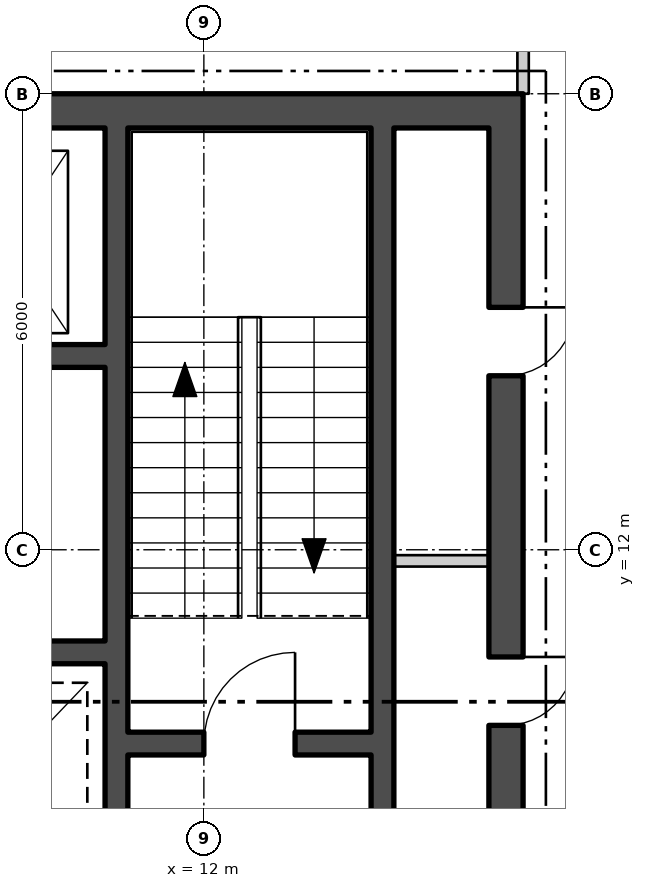
"""IFC4 building model, lengths in metres.
Left out: names, types, materials, properties, quantities, classifications, styles, units other than length and angle.
Written with IfcOpenShell. Run it as: python <this file> out.ifc"""

import sys

from ifc_helpers import new_model, si_unit, direction, frame, frame_2d, origin, place, context, subcontext, project, spatial, polyline, rectangle, outline, extrude, element, fill, save


model = new_model("IFC4")
c1 = context("Model", 3, precision=1e-05, world=origin(), true_north=direction((0.0, 1.0)))
c2 = subcontext(c1, "Body", "Model", "MODEL_VIEW")
j1 = project(units=[si_unit("LENGTHUNIT", "METRE"), si_unit("PLANEANGLEUNIT", "RADIAN")], contexts=[c1])
p1 = place(None, origin())
s1 = spatial("IfcSite", under=j1, at=p1, CompositionType="ELEMENT")
p2 = place(p1, origin())
s2 = spatial("IfcBuilding", under=s1, at=p2, CompositionType="ELEMENT")
p3 = place(p2, frame((0.0, 0.0, 192.6)))
s3 = spatial("IfcBuildingStorey", under=s2, at=p3, CompositionType="ELEMENT", Elevation=192.6)
p4 = place(p3, frame((3.67, -25.994, -0.18), z_axis=(0.0, 0.0, 1.0), x_axis=(0.499999764979, 0.866025539474, 0.0)))
e1 = element("IfcWall", 1, at=p4, inside=s3, PredefinedType="SOLIDWALL", context=c2, shape_type="SweptSolid", body=[
    extrude(outline(polyline([(-0.13, -0.225), (45.87, -0.225), (45.61, 0.225), (0.13, 0.225), (-0.13, -0.225)])), origin(), (0.0, 0.0, 1.0), 3.68),
])
p5 = place(p4, frame((1.424, 0.0, 1.08)))
e2 = element("IfcOpeningElement", 2, at=p5, cuts=e1, PredefinedType="OPENING", context=c2, shape_type="SweptSolid", body=[
    extrude(rectangle(XDim=2.4, YDim=2.0, at=frame_2d((1.2, 1.0))), frame((0.0, 0.235, 0.0), z_axis=(0.0, -1.0, 0.0), x_axis=(1.0, 0.0, 0.0)), (0.0, 0.0, 1.0), 0.47),
])
p6 = place(p4, frame((5.893, 0.0, 1.08)))
e3 = element("IfcOpeningElement", 3, at=p6, cuts=e1, PredefinedType="OPENING", context=c2, shape_type="SweptSolid", body=[
    extrude(rectangle(XDim=2.4, YDim=2.0, at=frame_2d((1.2, 1.0))), frame((0.0, 0.235, 0.0), z_axis=(0.0, -1.0, 0.0), x_axis=(1.0, 0.0, 0.0)), (0.0, 0.0, 1.0), 0.47),
])
p7 = place(p4, frame((10.401, 0.0, 1.08)))
e4 = element("IfcOpeningElement", 4, at=p7, cuts=e1, PredefinedType="OPENING", context=c2, shape_type="SweptSolid", body=[
    extrude(rectangle(XDim=2.4, YDim=2.0, at=frame_2d((1.2, 1.0))), frame((0.0, 0.235, 0.0), z_axis=(0.0, -1.0, 0.0), x_axis=(1.0, 0.0, 0.0)), (0.0, 0.0, 1.0), 0.47),
])
p8 = place(p4, frame((14.909, 0.0, 1.08)))
e5 = element("IfcOpeningElement", 5, at=p8, cuts=e1, PredefinedType="OPENING", context=c2, shape_type="SweptSolid", body=[
    extrude(rectangle(XDim=2.4, YDim=2.0, at=frame_2d((1.2, 1.0))), frame((0.0, 0.235, 0.0), z_axis=(0.0, -1.0, 0.0), x_axis=(1.0, 0.0, 0.0)), (0.0, 0.0, 1.0), 0.47),
])
p9 = place(p4, frame((19.416, 0.0, 1.08)))
e6 = element("IfcOpeningElement", 6, at=p9, cuts=e1, PredefinedType="OPENING", context=c2, shape_type="SweptSolid", body=[
    extrude(rectangle(XDim=2.4, YDim=2.0, at=frame_2d((1.2, 1.0))), frame((0.0, 0.235, 0.0), z_axis=(0.0, -1.0, 0.0), x_axis=(1.0, 0.0, 0.0)), (0.0, 0.0, 1.0), 0.47),
])
p10 = place(p4, frame((23.924, 0.0, 1.08)))
e7 = element("IfcOpeningElement", 7, at=p10, cuts=e1, PredefinedType="OPENING", context=c2, shape_type="SweptSolid", body=[
    extrude(rectangle(XDim=2.4, YDim=2.0, at=frame_2d((1.2, 1.0))), frame((0.0, 0.235, 0.0), z_axis=(0.0, -1.0, 0.0), x_axis=(1.0, 0.0, 0.0)), (0.0, 0.0, 1.0), 0.47),
])
p11 = place(p4, frame((28.431, 0.0, 1.08)))
e8 = element("IfcOpeningElement", 8, at=p11, cuts=e1, PredefinedType="OPENING", context=c2, shape_type="SweptSolid", body=[
    extrude(rectangle(XDim=2.4, YDim=2.0, at=frame_2d((1.2, 1.0))), frame((0.0, 0.235, 0.0), z_axis=(0.0, -1.0, 0.0), x_axis=(1.0, 0.0, 0.0)), (0.0, 0.0, 1.0), 0.47),
])
p12 = place(p4, frame((32.939, 0.0, 1.08)))
e9 = element("IfcOpeningElement", 9, at=p12, cuts=e1, PredefinedType="OPENING", context=c2, shape_type="SweptSolid", body=[
    extrude(rectangle(XDim=2.4, YDim=2.0, at=frame_2d((1.2, 1.0))), frame((0.0, 0.235, 0.0), z_axis=(0.0, -1.0, 0.0), x_axis=(1.0, 0.0, 0.0)), (0.0, 0.0, 1.0), 0.47),
])
p13 = place(p4, frame((37.447, 0.0, 1.08)))
e10 = element("IfcOpeningElement", 10, at=p13, cuts=e1, PredefinedType="OPENING", context=c2, shape_type="SweptSolid", body=[
    extrude(rectangle(XDim=2.4, YDim=2.0, at=frame_2d((1.2, 1.0))), frame((0.0, 0.235, 0.0), z_axis=(0.0, -1.0, 0.0), x_axis=(1.0, 0.0, 0.0)), (0.0, 0.0, 1.0), 0.47),
])
p14 = place(p4, frame((41.916, 0.0, 1.08)))
e11 = element("IfcOpeningElement", 11, at=p14, cuts=e1, PredefinedType="OPENING", context=c2, shape_type="SweptSolid", body=[
    extrude(rectangle(XDim=2.4, YDim=2.0, at=frame_2d((1.2, 1.0))), frame((0.0, 0.235, 0.0), z_axis=(0.0, -1.0, 0.0), x_axis=(1.0, 0.0, 0.0)), (0.0, 0.0, 1.0), 0.47),
])
p15 = place(p3, frame((-16.2, 17.775, 0.0), z_axis=(0.0, 0.0, 1.0), x_axis=(1.0, 0.0, 0.0)))
e12 = element("IfcWall", 12, at=p15, inside=s3, PredefinedType="SHEAR", context=c2, shape_type="SweptSolid", body=[
    extrude(rectangle(XDim=32.4, YDim=0.45, at=frame_2d((16.2, 0.0))), origin(), (0.0, 0.0, 1.0), 3.7),
])
p16 = place(p3, frame((15.975, 2.45, 0.0), z_axis=(0.0, 0.0, 1.0), x_axis=(0.0, 1.0, 0.0)))
e13 = element("IfcWall", 13, at=p16, inside=s3, PredefinedType="SHEAR", context=c2, shape_type="SweptSolid", body=[
    extrude(rectangle(XDim=15.1, YDim=0.45, at=frame_2d((7.55, 0.0))), origin(), (0.0, 0.0, 1.0), 3.7),
])
p17 = place(p16, frame((4.4, 0.0, 0.0)))
e14 = element("IfcOpeningElement", 14, at=p17, cuts=e13, PredefinedType="OPENING", context=c2, shape_type="SweptSolid", body=[
    extrude(rectangle(XDim=1.5, YDim=2.1, at=frame_2d((0.75, 1.05))), frame((0.0, 0.235, 0.0), z_axis=(0.0, -1.0, 0.0), x_axis=(1.0, 0.0, 0.0)), (0.0, 0.0, 1.0), 0.47),
])
p18 = place(p16, frame((0.85, 0.0, 0.0)))
e15 = element("IfcOpeningElement", 15, at=p18, cuts=e13, PredefinedType="OPENING", context=c2, shape_type="SweptSolid", body=[
    extrude(rectangle(XDim=0.9, YDim=2.1, at=frame_2d((0.45, 1.05))), frame((0.0, 0.235, 0.0), z_axis=(0.0, -1.0, 0.0), x_axis=(1.0, 0.0, 0.0)), (0.0, 0.0, 1.0), 0.47),
])
p19 = place(p16, frame((3.0, 0.0, 0.0)))
e16 = element("IfcOpeningElement", 16, at=p19, cuts=e13, PredefinedType="OPENING", context=c2, shape_type="SweptSolid", body=[
    extrude(rectangle(XDim=1.0, YDim=2.1, at=frame_2d((0.5, 1.05))), frame((0.0, 0.235, 0.0), z_axis=(0.0, -1.0, 0.0), x_axis=(1.0, 0.0, 0.0)), (0.0, 0.0, 1.0), 0.47),
])
p20 = place(p16, frame((7.239, 0.0, 0.0)))
e17 = element("IfcOpeningElement", 17, at=p20, cuts=e13, PredefinedType="OPENING", context=c2, shape_type="SweptSolid", body=[
    extrude(rectangle(XDim=0.9, YDim=2.1, at=frame_2d((0.45, 1.05))), frame((0.0, 0.235, 0.0), z_axis=(0.0, -1.0, 0.0), x_axis=(1.0, 0.0, 0.0)), (0.0, 0.0, 1.0), 0.47),
])
p21 = place(p16, frame((11.839, 0.0, 0.0)))
e18 = element("IfcOpeningElement", 18, at=p21, cuts=e13, PredefinedType="OPENING", context=c2, shape_type="SweptSolid", body=[
    extrude(rectangle(XDim=0.9, YDim=2.1, at=frame_2d((0.45, 1.05))), frame((0.0, 0.235, 0.0), z_axis=(0.0, -1.0, 0.0), x_axis=(1.0, 0.0, 0.0)), (0.0, 0.0, 1.0), 0.47),
])
p22 = place(p3, frame((10.85, 2.45, 0.0), z_axis=(0.0, 0.0, 1.0), x_axis=(0.0, 1.0, 0.0)))
e19 = element("IfcWall", 19, at=p22, inside=s3, PredefinedType="SHEAR", context=c2, shape_type="SweptSolid", body=[
    extrude(rectangle(XDim=15.1, YDim=0.3, at=frame_2d((7.55, 0.0))), origin(), (0.0, 0.0, 1.0), 3.7),
])
p23 = place(p22, frame((3.525, 0.0, 0.0)))
e20 = element("IfcOpeningElement", 20, at=p23, cuts=e19, PredefinedType="OPENING", context=c2, shape_type="SweptSolid", body=[
    extrude(rectangle(XDim=1.25, YDim=2.1, at=frame_2d((0.625, 1.05))), frame((0.0, 0.16, 0.0), z_axis=(0.0, -1.0, 0.0), x_axis=(1.0, 0.0, 0.0)), (0.0, 0.0, 1.0), 0.32),
])
p24 = place(p22, frame((1.15, 0.0, 0.0)))
e21 = element("IfcOpeningElement", 21, at=p24, cuts=e19, PredefinedType="OPENING", context=c2, shape_type="SweptSolid", body=[
    extrude(rectangle(XDim=1.0, YDim=2.1, at=frame_2d((0.5, 1.05))), frame((0.0, 0.16, 0.0), z_axis=(0.0, -1.0, 0.0), x_axis=(1.0, 0.0, 0.0)), (0.0, 0.0, 1.0), 0.32),
])
p25 = place(p3, frame((14.35, 2.45, 0.0), z_axis=(0.0, 0.0, 1.0), x_axis=(0.0, 1.0, 0.0)))
e22 = element("IfcWall", 22, at=p25, inside=s3, PredefinedType="SHEAR", context=c2, shape_type="SweptSolid", body=[
    extrude(rectangle(XDim=15.1, YDim=0.3, at=frame_2d((7.55, 0.0))), origin(), (0.0, 0.0, 1.0), 3.7),
])
p26 = place(p25, frame((4.4, 0.0, 0.0)))
e23 = element("IfcOpeningElement", 23, at=p26, cuts=e22, PredefinedType="OPENING", context=c2, shape_type="SweptSolid", body=[
    extrude(rectangle(XDim=1.5, YDim=2.1, at=frame_2d((0.75, 1.05))), frame((0.0, 0.16, 0.0), z_axis=(0.0, -1.0, 0.0), x_axis=(1.0, 0.0, 0.0)), (0.0, 0.0, 1.0), 0.32),
])
p27 = place(p3, frame((11.0, 9.45, 0.0), z_axis=(0.0, 0.0, 1.0), x_axis=(1.0, 0.0, 0.0)))
e24 = element("IfcWall", 24, at=p27, inside=s3, PredefinedType="SHEAR", context=c2, shape_type="SweptSolid", body=[
    extrude(rectangle(XDim=3.2, YDim=0.3, at=frame_2d((1.6, 0.0))), origin(), (0.0, 0.0, 1.0), 3.7),
])
p28 = place(p27, frame((1.0, 0.0, 0.0)))
e25 = element("IfcOpeningElement", 25, at=p28, cuts=e24, PredefinedType="OPENING", context=c2, shape_type="SweptSolid", body=[
    extrude(rectangle(XDim=1.2, YDim=2.1, at=frame_2d((0.6, 1.05))), frame((0.0, 0.16, 0.0), z_axis=(0.0, -1.0, 0.0), x_axis=(1.0, 0.0, 0.0)), (0.0, 0.0, 1.0), 0.32),
])
p29 = place(p3, frame((-10.7, 14.55, 0.0), z_axis=(0.0, 0.0, 1.0), x_axis=(1.0, 0.0, 0.0)))
e26 = element("IfcWall", 26, at=p29, inside=s3, PredefinedType="SHEAR", context=c2, shape_type="SweptSolid", body=[
    extrude(rectangle(XDim=21.4, YDim=0.3, at=frame_2d((10.7, 0.0))), origin(), (0.0, 0.0, 1.0), 3.7),
])
p30 = place(p29, frame((0.738, 0.0, 0.0)))
e27 = element("IfcOpeningElement", 27, at=p30, cuts=e26, PredefinedType="OPENING", context=c2, shape_type="SweptSolid", body=[
    extrude(rectangle(XDim=1.1, YDim=2.1, at=frame_2d((0.55, 1.05))), frame((0.0, 0.16, 0.0), z_axis=(0.0, -1.0, 0.0), x_axis=(1.0, 0.0, 0.0)), (0.0, 0.0, 1.0), 0.32),
])
p31 = place(p29, frame((3.462, 0.0, 0.0)))
e28 = element("IfcOpeningElement", 28, at=p31, cuts=e26, PredefinedType="OPENING", context=c2, shape_type="SweptSolid", body=[
    extrude(rectangle(XDim=1.1, YDim=2.1, at=frame_2d((0.55, 1.05))), frame((0.0, 0.16, 0.0), z_axis=(0.0, -1.0, 0.0), x_axis=(1.0, 0.0, 0.0)), (0.0, 0.0, 1.0), 0.32),
])
p32 = place(p29, frame((6.138, 0.0, 0.0)))
e29 = element("IfcOpeningElement", 29, at=p32, cuts=e26, PredefinedType="OPENING", context=c2, shape_type="SweptSolid", body=[
    extrude(rectangle(XDim=1.1, YDim=2.1, at=frame_2d((0.55, 1.05))), frame((0.0, 0.16, 0.0), z_axis=(0.0, -1.0, 0.0), x_axis=(1.0, 0.0, 0.0)), (0.0, 0.0, 1.0), 0.32),
])
p33 = place(p29, frame((8.812, 0.0, 0.0)))
e30 = element("IfcOpeningElement", 30, at=p33, cuts=e26, PredefinedType="OPENING", context=c2, shape_type="SweptSolid", body=[
    extrude(rectangle(XDim=1.1, YDim=2.1, at=frame_2d((0.55, 1.05))), frame((0.0, 0.16, 0.0), z_axis=(0.0, -1.0, 0.0), x_axis=(1.0, 0.0, 0.0)), (0.0, 0.0, 1.0), 0.32),
])
p34 = place(p29, frame((19.562, 0.0, 0.0)))
e31 = element("IfcOpeningElement", 31, at=p34, cuts=e26, PredefinedType="OPENING", context=c2, shape_type="SweptSolid", body=[
    extrude(rectangle(XDim=1.1, YDim=2.1, at=frame_2d((0.55, 1.05))), frame((0.0, 0.16, 0.0), z_axis=(0.0, -1.0, 0.0), x_axis=(1.0, 0.0, 0.0)), (0.0, 0.0, 1.0), 0.32),
])
p35 = place(p29, frame((11.537, 0.0, 0.0)))
e32 = element("IfcOpeningElement", 32, at=p35, cuts=e26, PredefinedType="OPENING", context=c2, shape_type="SweptSolid", body=[
    extrude(rectangle(XDim=1.0, YDim=2.1, at=frame_2d((0.5, 1.05))), frame((0.0, 0.16, 0.0), z_axis=(0.0, -1.0, 0.0), x_axis=(1.0, 0.0, 0.0)), (0.0, 0.0, 1.0), 0.32),
])
p36 = place(p29, frame((14.213, 0.0, 0.0)))
e33 = element("IfcOpeningElement", 33, at=p36, cuts=e26, PredefinedType="OPENING", context=c2, shape_type="SweptSolid", body=[
    extrude(rectangle(XDim=1.0, YDim=2.1, at=frame_2d((0.5, 1.05))), frame((0.0, 0.16, 0.0), z_axis=(0.0, -1.0, 0.0), x_axis=(1.0, 0.0, 0.0)), (0.0, 0.0, 1.0), 0.32),
])
p37 = place(p29, frame((16.887, 0.0, 0.0)))
e34 = element("IfcOpeningElement", 34, at=p37, cuts=e26, PredefinedType="OPENING", context=c2, shape_type="SweptSolid", body=[
    extrude(rectangle(XDim=1.0, YDim=2.1, at=frame_2d((0.5, 1.05))), frame((0.0, 0.16, 0.0), z_axis=(0.0, -1.0, 0.0), x_axis=(1.0, 0.0, 0.0)), (0.0, 0.0, 1.0), 0.32),
])
p38 = place(p3, frame((2.6, 10.65, 0.0), z_axis=(0.0, 0.0, 1.0), x_axis=(1.0, 0.0, 0.0)))
e35 = element("IfcWall", 35, at=p38, inside=s3, PredefinedType="SHEAR", context=c2, shape_type="SweptSolid", body=[
    extrude(rectangle(XDim=8.1, YDim=0.3, at=frame_2d((4.05, 0.0))), origin(), (0.0, 0.0, 1.0), 3.7),
])
p39 = place(p38, frame((0.933, 0.0, 0.0)))
e36 = element("IfcOpeningElement", 36, at=p39, cuts=e35, PredefinedType="OPENING", context=c2, shape_type="SweptSolid", body=[
    extrude(rectangle(XDim=1.0, YDim=2.1, at=frame_2d((0.5, 1.05))), frame((0.0, 0.16, 0.0), z_axis=(0.0, -1.0, 0.0), x_axis=(1.0, 0.0, 0.0)), (0.0, 0.0, 1.0), 0.32),
])
p40 = place(p3, frame((14.5, 11.854, 0.0), z_axis=(0.0, 0.0, 1.0), x_axis=(1.0, 0.0, 0.0)))
e37 = element("IfcWall", 37, at=p40, inside=s3, PredefinedType="PARTITIONING", context=c2, shape_type="SweptSolid", body=[
    extrude(rectangle(XDim=1.25, YDim=0.15, at=frame_2d((0.625, 0.0))), origin(), (0.0, 0.0, 1.0), 3.7),
])
p41 = place(p3, frame((16.2, 18.0, 0.0), z_axis=(0.0, 0.0, 1.0), x_axis=(0.0, 1.0, 0.0)))
e38 = element("IfcWall", 38, at=p41, inside=s3, PredefinedType="PARTITIONING", context=c2, shape_type="SweptSolid", body=[
    extrude(rectangle(XDim=1.75, YDim=0.15, at=frame_2d((0.875, 0.0))), origin(), (0.0, 0.0, 1.0), 3.7),
])
p42 = place(p28, origin())
e39 = element("IfcDoor", 39, at=p42, inside=s3, OperationType="SINGLE_SWING_LEFT", PredefinedType="DOOR", context=c2, shape_type="SweptSolid", body=[
    extrude(rectangle(XDim=1.2, YDim=2.1, at=frame_2d((0.6, 1.05))), frame((0.0, 0.025, 0.0), z_axis=(0.0, -1.0, 0.0), x_axis=(1.0, 0.0, 0.0)), (0.0, 0.0, 1.0), 0.05),
])
fill(e25, e39)
p43 = place(p20, origin())
e40 = element("IfcDoor", 40, at=p43, inside=s3, OperationType="SINGLE_SWING_RIGHT", PredefinedType="DOOR", context=c2, shape_type="SweptSolid", body=[
    extrude(rectangle(XDim=0.9, YDim=2.1, at=frame_2d((0.45, 1.05))), frame((0.0, 0.025, 0.0), z_axis=(0.0, -1.0, 0.0), x_axis=(1.0, 0.0, 0.0)), (0.0, 0.0, 1.0), 0.05),
])
fill(e17, e40)
p44 = place(p21, origin())
e41 = element("IfcDoor", 41, at=p44, inside=s3, OperationType="SINGLE_SWING_RIGHT", PredefinedType="DOOR", context=c2, shape_type="SweptSolid", body=[
    extrude(rectangle(XDim=0.9, YDim=2.1, at=frame_2d((0.45, 1.05))), frame((0.0, 0.025, 0.0), z_axis=(0.0, -1.0, 0.0), x_axis=(1.0, 0.0, 0.0)), (0.0, 0.0, 1.0), 0.05),
])
fill(e18, e41)
save(model, sys.argv[1])
